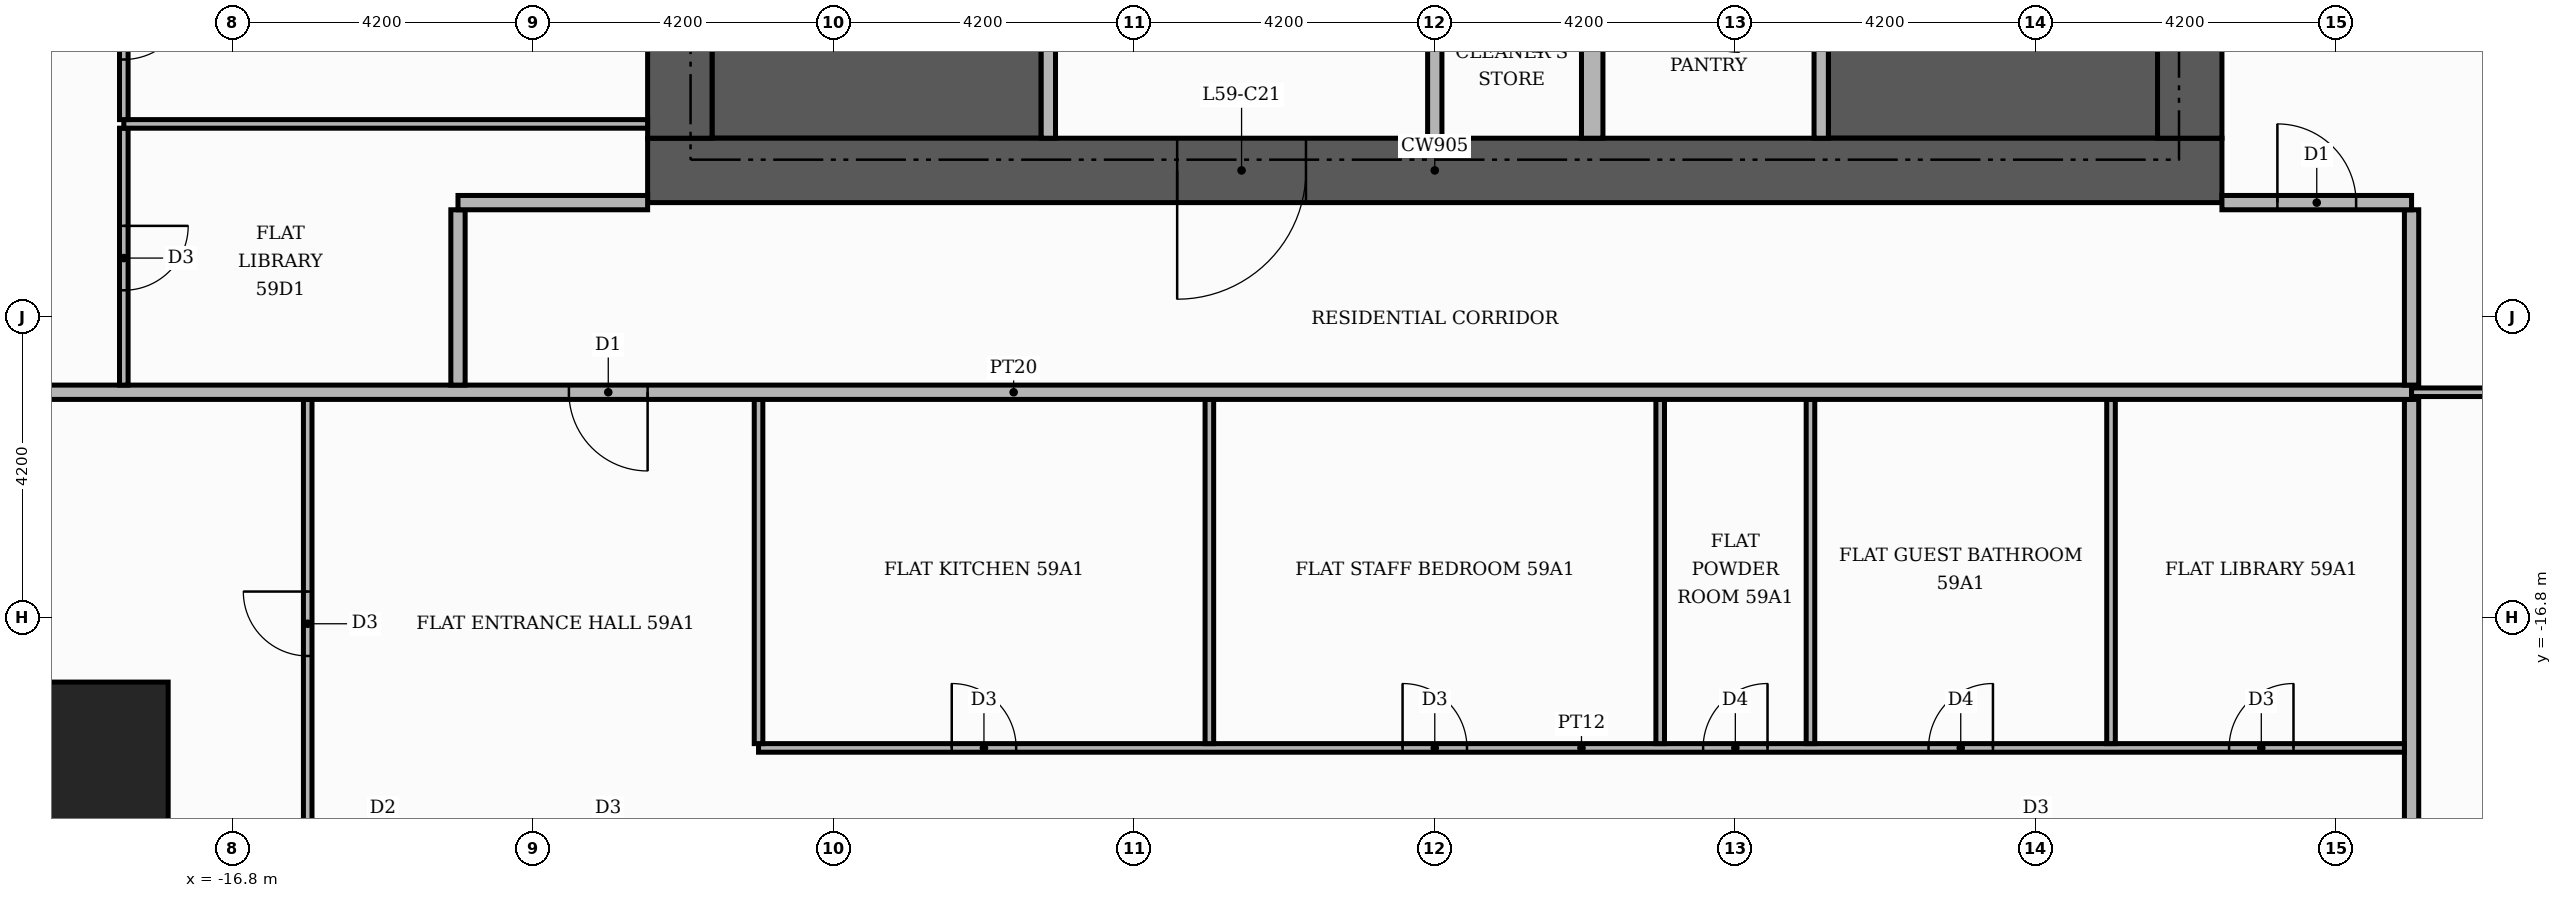
"""IFC4 building model, lengths in metres.
Left out: names, types, materials, properties, quantities, classifications, styles, units other than length and angle.
Written with IfcOpenShell. Run it as: python <this file> out.ifc"""

import sys

from ifc_helpers import new_model, si_unit, direction, frame, frame_2d, origin, origin_2d, place, context, subcontext, project, spatial, rectangle, extrude, element, fill, save


model = new_model("IFC4")
c1 = context("Model", 3, precision=1e-05, world=origin(), true_north=direction((0.0, 1.0)))
c2 = subcontext(c1, "Body", "Model", "MODEL_VIEW")
j1 = project(units=[si_unit("LENGTHUNIT", "METRE"), si_unit("PLANEANGLEUNIT", "RADIAN")], contexts=[c1])
p1 = place(None, origin())
s1 = spatial("IfcSite", under=j1, at=p1, CompositionType="ELEMENT")
p2 = place(p1, origin())
s2 = spatial("IfcBuilding", under=s1, at=p2, CompositionType="ELEMENT")
p3 = place(p2, frame((0.0, 0.0, 248.4)))
s3 = spatial("IfcBuildingStorey", under=s2, at=p3, CompositionType="ELEMENT", Elevation=248.4)
for number, where, z_axis, x_axis in (
    (1, (-10.1, -9.15, 0.0), (0.0, 0.0, 1.0), (1.0, 0.0, 0.0)),
    (2, (5.5, -9.15, 0.0), (0.0, 0.0, 1.0), (1.0, 0.0, 0.0)),
):
    element("IfcWall", number, at=place(p3, frame(where, z_axis=z_axis, x_axis=x_axis)), inside=s3, PredefinedType="SHEAR", context=c2, shape_type="SweptSolid", body=[
        extrude(rectangle(XDim=4.6, YDim=1.9, at=frame_2d((2.3, 0.0))), origin(), (0.0, 0.0, 1.0), 3.48),
    ])
p4 = place(p3, frame((-11.0, -10.55, 0.0), z_axis=(0.0, 0.0, 1.0), x_axis=(1.0, 0.0, 0.0)))
e3 = element("IfcWall", 3, at=p4, inside=s3, PredefinedType="SHEAR", context=c2, shape_type="SweptSolid", body=[
    extrude(rectangle(XDim=22.0, YDim=0.9, at=frame_2d((11.0, 0.0))), origin(), (0.0, 0.0, 1.0), 3.48),
])
p5 = place(p4, frame((7.4, 0.0, 0.0)))
e4 = element("IfcOpeningElement", 4, at=p5, cuts=e3, PredefinedType="OPENING", context=c2, shape_type="SweptSolid", body=[
    extrude(rectangle(XDim=1.8, YDim=2.2, at=frame_2d((0.9, 1.1))), frame((0.0, 0.46, 0.0), z_axis=(0.0, -1.0, 0.0), x_axis=(1.0, 0.0, 0.0)), (0.0, 0.0, 1.0), 0.92),
])
for number, where, z_axis, x_axis in (
    (5, (-10.55, -10.1, 0.0), (0.0, 0.0, 1.0), (0.0, 1.0, 0.0)),
    (6, (10.55, -10.1, 0.0), (0.0, 0.0, 1.0), (0.0, 1.0, 0.0)),
):
    element("IfcWall", number, at=place(p3, frame(where, z_axis=z_axis, x_axis=x_axis)), inside=s3, PredefinedType="SHEAR", context=c2, shape_type="SweptSolid", body=[
        extrude(rectangle(XDim=20.2, YDim=0.9, at=frame_2d((10.1, 0.0))), origin(), (0.0, 0.0, 1.0), 3.48),
    ])
p6 = place(p3, frame((-18.8, -18.8, 0.0), z_axis=(0.0, 0.0, 1.0), x_axis=(1.0, 0.0, 0.0)))
e7 = element("IfcColumn", 7, at=p6, inside=s3, PredefinedType="COLUMN", context=c2, shape_type="SweptSolid", body=[
    extrude(rectangle(XDim=2.2, YDim=2.2, at=origin_2d()), origin(), (0.0, 0.0, 1.0), 3.9),
])
p7 = place(p3, frame((-5.4, -10.1, 0.0), z_axis=(0.0, 0.0, 1.0), x_axis=(0.0, 1.0, 0.0)))
e8 = element("IfcWall", 8, at=p7, inside=s3, PredefinedType="PARTITIONING", context=c2, shape_type="SweptSolid", body=[
    extrude(rectangle(XDim=4.6, YDim=0.2, at=frame_2d((2.3, 0.0))), origin(), (0.0, 0.0, 1.0), 3.48),
])
p8 = place(p7, frame((2.9, 0.0, 0.0)))
e9 = element("IfcOpeningElement", 9, at=p8, cuts=e8, PredefinedType="OPENING", context=c2, shape_type="SweptSolid", body=[
    extrude(rectangle(XDim=1.0, YDim=2.1, at=frame_2d((0.5, 1.05))), frame((0.0, 0.11, 0.0), z_axis=(0.0, -1.0, 0.0), x_axis=(1.0, 0.0, 0.0)), (0.0, 0.0, 1.0), 0.22),
])
p9 = place(p3, frame((0.0, -10.1, 0.0), z_axis=(0.0, 0.0, 1.0), x_axis=(0.0, 1.0, 0.0)))
e10 = element("IfcWall", 10, at=p9, inside=s3, PredefinedType="PARTITIONING", context=c2, shape_type="SweptSolid", body=[
    extrude(rectangle(XDim=2.2, YDim=0.2, at=frame_2d((1.1, 0.0))), origin(), (0.0, 0.0, 1.0), 3.48),
])
p10 = place(p3, frame((2.2, -10.1, 0.0), z_axis=(0.0, 0.0, 1.0), x_axis=(0.0, 1.0, 0.0)))
e11 = element("IfcWall", 11, at=p10, inside=s3, PredefinedType="PARTITIONING", context=c2, shape_type="SweptSolid", body=[
    extrude(rectangle(XDim=2.2, YDim=0.3, at=frame_2d((1.1, 0.0))), origin(), (0.0, 0.0, 1.0), 3.48),
])
p11 = place(p3, frame((5.4, -10.1, 0.0), z_axis=(0.0, 0.0, 1.0), x_axis=(0.0, 1.0, 0.0)))
e12 = element("IfcWall", 12, at=p11, inside=s3, PredefinedType="PARTITIONING", context=c2, shape_type="SweptSolid", body=[
    extrude(rectangle(XDim=4.6, YDim=0.2, at=frame_2d((2.3, 0.0))), origin(), (0.0, 0.0, 1.0), 3.48),
])
p12 = place(p11, frame((2.9, 0.0, 0.0)))
e13 = element("IfcOpeningElement", 13, at=p12, cuts=e12, PredefinedType="OPENING", context=c2, shape_type="SweptSolid", body=[
    extrude(rectangle(XDim=1.0, YDim=2.1, at=frame_2d((0.5, 1.05))), frame((0.0, 0.11, 0.0), z_axis=(0.0, -1.0, 0.0), x_axis=(1.0, 0.0, 0.0)), (0.0, 0.0, 1.0), 0.22),
])
p13 = place(p3, frame((13.65, -25.42, 0.0), z_axis=(0.0, 0.0, 1.0), x_axis=(0.0, 1.0, 0.0)))
e14 = element("IfcWall", 14, at=p13, inside=s3, PredefinedType="PARTITIONING", context=c2, shape_type="SweptSolid", body=[
    extrude(rectangle(XDim=11.67, YDim=0.2, at=frame_2d((5.835, 0.0))), origin(), (0.0, 0.0, 1.0), 3.48),
])
p14 = place(p3, frame((-15.75, -20.06, 0.0), z_axis=(0.0, 0.0, 1.0), x_axis=(0.0, 1.0, 0.0)))
e15 = element("IfcWall", 15, at=p14, inside=s3, PredefinedType="PARTITIONING", context=c2, shape_type="SweptSolid", body=[
    extrude(rectangle(XDim=6.31, YDim=0.12, at=frame_2d((3.155, 0.0))), origin(), (0.0, 0.0, 1.0), 3.48),
])
p15 = place(p14, frame((2.725, 0.0, 0.0)))
e16 = element("IfcOpeningElement", 16, at=p15, cuts=e15, PredefinedType="OPENING", context=c2, shape_type="SweptSolid", body=[
    extrude(rectangle(XDim=0.9, YDim=2.1, at=frame_2d((0.45, 1.05))), frame((0.0, 0.07, 0.0), z_axis=(0.0, -1.0, 0.0), x_axis=(1.0, 0.0, 0.0)), (0.0, 0.0, 1.0), 0.14),
])
p16 = place(p3, frame((-9.45, -18.62, 0.0), z_axis=(0.0, 0.0, 1.0), x_axis=(1.0, 0.0, 0.0)))
e17 = element("IfcWall", 17, at=p16, inside=s3, PredefinedType="PARTITIONING", context=c2, shape_type="SweptSolid", body=[
    extrude(rectangle(XDim=23.0, YDim=0.12, at=frame_2d((11.5, 0.0))), origin(), (0.0, 0.0, 1.0), 3.48),
])
p17 = place(p16, frame((2.7, 0.0, 0.0)))
e18 = element("IfcOpeningElement", 18, at=p17, cuts=e17, PredefinedType="OPENING", context=c2, shape_type="SweptSolid", body=[
    extrude(rectangle(XDim=0.9, YDim=2.1, at=frame_2d((0.45, 1.05))), frame((0.0, 0.07, 0.0), z_axis=(0.0, -1.0, 0.0), x_axis=(1.0, 0.0, 0.0)), (0.0, 0.0, 1.0), 0.14),
])
p18 = place(p16, frame((9.0, 0.0, 0.0)))
e19 = element("IfcOpeningElement", 19, at=p18, cuts=e17, PredefinedType="OPENING", context=c2, shape_type="SweptSolid", body=[
    extrude(rectangle(XDim=0.9, YDim=2.1, at=frame_2d((0.45, 1.05))), frame((0.0, 0.07, 0.0), z_axis=(0.0, -1.0, 0.0), x_axis=(1.0, 0.0, 0.0)), (0.0, 0.0, 1.0), 0.14),
])
p19 = place(p16, frame((13.2, 0.0, 0.0)))
e20 = element("IfcOpeningElement", 20, at=p19, cuts=e17, PredefinedType="OPENING", context=c2, shape_type="SweptSolid", body=[
    extrude(rectangle(XDim=0.9, YDim=2.1, at=frame_2d((0.45, 1.05))), frame((0.0, 0.07, 0.0), z_axis=(0.0, -1.0, 0.0), x_axis=(1.0, 0.0, 0.0)), (0.0, 0.0, 1.0), 0.14),
])
p20 = place(p16, frame((16.35, 0.0, 0.0)))
e21 = element("IfcOpeningElement", 21, at=p20, cuts=e17, PredefinedType="OPENING", context=c2, shape_type="SweptSolid", body=[
    extrude(rectangle(XDim=0.9, YDim=2.1, at=frame_2d((0.45, 1.05))), frame((0.0, 0.07, 0.0), z_axis=(0.0, -1.0, 0.0), x_axis=(1.0, 0.0, 0.0)), (0.0, 0.0, 1.0), 0.14),
])
p21 = place(p16, frame((20.55, 0.0, 0.0)))
e22 = element("IfcOpeningElement", 22, at=p21, cuts=e17, PredefinedType="OPENING", context=c2, shape_type="SweptSolid", body=[
    extrude(rectangle(XDim=0.9, YDim=2.1, at=frame_2d((0.45, 1.05))), frame((0.0, 0.07, 0.0), z_axis=(0.0, -1.0, 0.0), x_axis=(1.0, 0.0, 0.0)), (0.0, 0.0, 1.0), 0.14),
])
for number, where, z_axis, x_axis in (
    (23, (-9.45, -18.56, 0.0), (0.0, 0.0, 1.0), (0.0, 1.0, 0.0)),
    (24, (-3.15, -18.56, 0.0), (0.0, 0.0, 1.0), (0.0, 1.0, 0.0)),
    (25, (3.15, -18.56, 0.0), (0.0, 0.0, 1.0), (0.0, 1.0, 0.0)),
    (26, (5.25, -18.56, 0.0), (0.0, 0.0, 1.0), (0.0, 1.0, 0.0)),
    (27, (9.45, -18.56, 0.0), (0.0, 0.0, 1.0), (0.0, 1.0, 0.0)),
):
    element("IfcWall", number, at=place(p3, frame(where, z_axis=z_axis, x_axis=x_axis)), inside=s3, PredefinedType="PARTITIONING", context=c2, shape_type="SweptSolid", body=[
        extrude(rectangle(XDim=4.81, YDim=0.12, at=frame_2d((2.405, 0.0))), origin(), (0.0, 0.0, 1.0), 3.48),
    ])
p22 = place(p3, frame((-25.42, -13.65, 0.0), z_axis=(0.0, 0.0, 1.0), x_axis=(1.0, 0.0, 0.0)))
e28 = element("IfcWall", 28, at=p22, inside=s3, PredefinedType="PARTITIONING", context=c2, shape_type="SweptSolid", body=[
    extrude(rectangle(XDim=39.07, YDim=0.2, at=frame_2d((19.535, 0.0))), origin(), (0.0, 0.0, 1.0), 3.48),
])
p23 = place(p22, frame((13.32, 0.0, 0.0)))
e29 = element("IfcOpeningElement", 29, at=p23, cuts=e28, PredefinedType="OPENING", context=c2, shape_type="SweptSolid", body=[
    extrude(rectangle(XDim=1.1, YDim=2.4, at=frame_2d((0.55, 1.2))), frame((0.0, 0.11, 0.0), z_axis=(0.0, -1.0, 0.0), x_axis=(1.0, 0.0, 0.0)), (0.0, 0.0, 1.0), 0.22),
])
p24 = place(p3, frame((13.65, -13.65, 0.0), z_axis=(0.0, 0.0, 1.0), x_axis=(1.0, 0.0, 0.0)))
e30 = element("IfcWall", 30, at=p24, inside=s3, PredefinedType="PARTITIONING", context=c2, shape_type="SweptSolid", body=[
    extrude(rectangle(XDim=7.07, YDim=0.12, at=frame_2d((3.535, 0.0))), origin(), (0.0, 0.0, 1.0), 3.48),
])
p25 = place(p24, frame((3.085, 0.0, 0.0)))
e31 = element("IfcOpeningElement", 31, at=p25, cuts=e30, PredefinedType="OPENING", context=c2, shape_type="SweptSolid", body=[
    extrude(rectangle(XDim=0.9, YDim=2.1, at=frame_2d((0.45, 1.05))), frame((0.0, 0.07, 0.0), z_axis=(0.0, -1.0, 0.0), x_axis=(1.0, 0.0, 0.0)), (0.0, 0.0, 1.0), 0.14),
])
p26 = place(p3, frame((-18.32, -13.55, 0.0), z_axis=(0.0, 0.0, 1.0), x_axis=(0.0, 1.0, 0.0)))
e32 = element("IfcWall", 32, at=p26, inside=s3, PredefinedType="PARTITIONING", context=c2, shape_type="SweptSolid", body=[
    extrude(rectangle(XDim=3.59, YDim=0.12, at=frame_2d((1.795, 0.0))), origin(), (0.0, 0.0, 1.0), 3.48),
])
p27 = place(p26, frame((1.325, 0.0, 0.0)))
e33 = element("IfcOpeningElement", 33, at=p27, cuts=e32, PredefinedType="OPENING", context=c2, shape_type="SweptSolid", body=[
    extrude(rectangle(XDim=0.9, YDim=2.1, at=frame_2d((0.45, 1.05))), frame((0.0, 0.07, 0.0), z_axis=(0.0, -1.0, 0.0), x_axis=(1.0, 0.0, 0.0)), (0.0, 0.0, 1.0), 0.14),
])
for number, where, z_axis, x_axis in (
    (34, (-13.65, -13.55, 0.0), (0.0, 0.0, 1.0), (0.0, 1.0, 0.0)),
    (35, (13.65, -13.55, 0.0), (0.0, 0.0, 1.0), (0.0, 1.0, 0.0)),
):
    element("IfcWall", number, at=place(p3, frame(where, z_axis=z_axis, x_axis=x_axis)), inside=s3, PredefinedType="PARTITIONING", context=c2, shape_type="SweptSolid", body=[
        extrude(rectangle(XDim=2.45, YDim=0.2, at=frame_2d((1.225, 0.0))), origin(), (0.0, 0.0, 1.0), 3.48),
    ])
p28 = place(p3, frame((-13.65, -11.0, 0.0), z_axis=(0.0, 0.0, 1.0), x_axis=(1.0, 0.0, 0.0)))
e36 = element("IfcWall", 36, at=p28, inside=s3, PredefinedType="PARTITIONING", context=c2, shape_type="SweptSolid", body=[
    extrude(rectangle(XDim=2.65, YDim=0.2, at=frame_2d((1.325, 0.0))), origin(), (0.0, 0.0, 1.0), 3.48),
])
p29 = place(p3, frame((11.0, -11.0, 0.0), z_axis=(0.0, 0.0, 1.0), x_axis=(1.0, 0.0, 0.0)))
e37 = element("IfcWall", 37, at=p29, inside=s3, PredefinedType="PARTITIONING", context=c2, shape_type="SweptSolid", body=[
    extrude(rectangle(XDim=2.65, YDim=0.2, at=frame_2d((1.325, 0.0))), origin(), (0.0, 0.0, 1.0), 3.48),
])
p30 = place(p29, frame((0.775, 0.0, 0.0)))
e38 = element("IfcOpeningElement", 38, at=p30, cuts=e37, PredefinedType="OPENING", context=c2, shape_type="SweptSolid", body=[
    extrude(rectangle(XDim=1.1, YDim=2.4, at=frame_2d((0.55, 1.2))), frame((0.0, 0.11, 0.0), z_axis=(0.0, -1.0, 0.0), x_axis=(1.0, 0.0, 0.0)), (0.0, 0.0, 1.0), 0.22),
])
p31 = place(p3, frame((-18.32, -9.9, 0.0), z_axis=(0.0, 0.0, 1.0), x_axis=(1.0, 0.0, 0.0)))
e39 = element("IfcWall", 39, at=p31, inside=s3, PredefinedType="PARTITIONING", context=c2, shape_type="SweptSolid", body=[
    extrude(rectangle(XDim=7.32, YDim=0.12, at=frame_2d((3.66, 0.0))), origin(), (0.0, 0.0, 1.0), 3.48),
])
p32 = place(p3, frame((-18.32, -9.84, 0.0), z_axis=(0.0, 0.0, 1.0), x_axis=(0.0, 1.0, 0.0)))
e40 = element("IfcWall", 40, at=p32, inside=s3, PredefinedType="PARTITIONING", context=c2, shape_type="SweptSolid", body=[
    extrude(rectangle(XDim=2.58, YDim=0.12, at=frame_2d((1.29, 0.0))), origin(), (0.0, 0.0, 1.0), 3.48),
])
p33 = place(p32, frame((0.84, 0.0, 0.0)))
e41 = element("IfcOpeningElement", 41, at=p33, cuts=e40, PredefinedType="OPENING", context=c2, shape_type="SweptSolid", body=[
    extrude(rectangle(XDim=0.9, YDim=2.1, at=frame_2d((0.45, 1.05))), frame((0.0, 0.07, 0.0), z_axis=(0.0, -1.0, 0.0), x_axis=(1.0, 0.0, 0.0)), (0.0, 0.0, 1.0), 0.14),
])
p34 = place(p5, frame((1.8, 0.0, 0.0), z_axis=(0.0, 0.0, 1.0), x_axis=(-1.0, 0.0, 0.0)))
e42 = element("IfcDoor", 42, at=p34, inside=s3, OperationType="DOUBLE_DOOR_SINGLE_SWING", PredefinedType="DOOR", context=c2, shape_type="SweptSolid", body=[
    extrude(rectangle(XDim=1.8, YDim=2.2, at=frame_2d((0.9, 1.1))), frame((0.0, 0.025, 0.0), z_axis=(0.0, -1.0, 0.0), x_axis=(1.0, 0.0, 0.0)), (0.0, 0.0, 1.0), 0.05),
])
fill(e4, e42)
p35 = place(p23, frame((1.1, 0.0, 0.0), z_axis=(0.0, 0.0, 1.0), x_axis=(-1.0, 0.0, 0.0)))
e43 = element("IfcDoor", 43, at=p35, inside=s3, OperationType="SINGLE_SWING_RIGHT", PredefinedType="DOOR", context=c2, shape_type="SweptSolid", body=[
    extrude(rectangle(XDim=1.1, YDim=2.4, at=frame_2d((0.55, 1.2))), frame((0.0, 0.025, 0.0), z_axis=(0.0, -1.0, 0.0), x_axis=(1.0, 0.0, 0.0)), (0.0, 0.0, 1.0), 0.05),
])
fill(e29, e43)
p36 = place(p15, origin())
e44 = element("IfcDoor", 44, at=p36, inside=s3, OperationType="SINGLE_SWING_RIGHT", PredefinedType="DOOR", context=c2, shape_type="SweptSolid", body=[
    extrude(rectangle(XDim=0.9, YDim=2.1, at=frame_2d((0.45, 1.05))), frame((0.0, 0.025, 0.0), z_axis=(0.0, -1.0, 0.0), x_axis=(1.0, 0.0, 0.0)), (0.0, 0.0, 1.0), 0.05),
])
fill(e16, e44)
p37 = place(p17, origin())
e45 = element("IfcDoor", 45, at=p37, inside=s3, OperationType="SINGLE_SWING_LEFT", PredefinedType="DOOR", context=c2, shape_type="SweptSolid", body=[
    extrude(rectangle(XDim=0.9, YDim=2.1, at=frame_2d((0.45, 1.05))), frame((0.0, 0.025, 0.0), z_axis=(0.0, -1.0, 0.0), x_axis=(1.0, 0.0, 0.0)), (0.0, 0.0, 1.0), 0.05),
])
fill(e18, e45)
p38 = place(p18, origin())
e46 = element("IfcDoor", 46, at=p38, inside=s3, OperationType="SINGLE_SWING_LEFT", PredefinedType="DOOR", context=c2, shape_type="SweptSolid", body=[
    extrude(rectangle(XDim=0.9, YDim=2.1, at=frame_2d((0.45, 1.05))), frame((0.0, 0.025, 0.0), z_axis=(0.0, -1.0, 0.0), x_axis=(1.0, 0.0, 0.0)), (0.0, 0.0, 1.0), 0.05),
])
fill(e19, e46)
p39 = place(p19, origin())
e47 = element("IfcDoor", 47, at=p39, inside=s3, OperationType="SINGLE_SWING_RIGHT", PredefinedType="DOOR", context=c2, shape_type="SweptSolid", body=[
    extrude(rectangle(XDim=0.9, YDim=2.1, at=frame_2d((0.45, 1.05))), frame((0.0, 0.025, 0.0), z_axis=(0.0, -1.0, 0.0), x_axis=(1.0, 0.0, 0.0)), (0.0, 0.0, 1.0), 0.05),
])
fill(e20, e47)
p40 = place(p20, origin())
e48 = element("IfcDoor", 48, at=p40, inside=s3, OperationType="SINGLE_SWING_RIGHT", PredefinedType="DOOR", context=c2, shape_type="SweptSolid", body=[
    extrude(rectangle(XDim=0.9, YDim=2.1, at=frame_2d((0.45, 1.05))), frame((0.0, 0.025, 0.0), z_axis=(0.0, -1.0, 0.0), x_axis=(1.0, 0.0, 0.0)), (0.0, 0.0, 1.0), 0.05),
])
fill(e21, e48)
p41 = place(p21, origin())
e49 = element("IfcDoor", 49, at=p41, inside=s3, OperationType="SINGLE_SWING_RIGHT", PredefinedType="DOOR", context=c2, shape_type="SweptSolid", body=[
    extrude(rectangle(XDim=0.9, YDim=2.1, at=frame_2d((0.45, 1.05))), frame((0.0, 0.025, 0.0), z_axis=(0.0, -1.0, 0.0), x_axis=(1.0, 0.0, 0.0)), (0.0, 0.0, 1.0), 0.05),
])
fill(e22, e49)
p42 = place(p30, origin())
e50 = element("IfcDoor", 50, at=p42, inside=s3, OperationType="SINGLE_SWING_LEFT", PredefinedType="DOOR", context=c2, shape_type="SweptSolid", body=[
    extrude(rectangle(XDim=1.1, YDim=2.4, at=frame_2d((0.55, 1.2))), frame((0.0, 0.025, 0.0), z_axis=(0.0, -1.0, 0.0), x_axis=(1.0, 0.0, 0.0)), (0.0, 0.0, 1.0), 0.05),
])
fill(e38, e50)
p43 = place(p33, frame((0.9, 0.0, 0.0), z_axis=(0.0, 0.0, 1.0), x_axis=(-1.0, 0.0, 0.0)))
e51 = element("IfcDoor", 51, at=p43, inside=s3, OperationType="SINGLE_SWING_RIGHT", PredefinedType="DOOR", context=c2, shape_type="SweptSolid", body=[
    extrude(rectangle(XDim=0.9, YDim=2.1, at=frame_2d((0.45, 1.05))), frame((0.0, 0.025, 0.0), z_axis=(0.0, -1.0, 0.0), x_axis=(1.0, 0.0, 0.0)), (0.0, 0.0, 1.0), 0.05),
])
fill(e41, e51)
p44 = place(p27, frame((0.9, 0.0, 0.0), z_axis=(0.0, 0.0, 1.0), x_axis=(-1.0, 0.0, 0.0)))
e52 = element("IfcDoor", 52, at=p44, inside=s3, OperationType="SINGLE_SWING_RIGHT", PredefinedType="DOOR", context=c2, shape_type="SweptSolid", body=[
    extrude(rectangle(XDim=0.9, YDim=2.1, at=frame_2d((0.45, 1.05))), frame((0.0, 0.025, 0.0), z_axis=(0.0, -1.0, 0.0), x_axis=(1.0, 0.0, 0.0)), (0.0, 0.0, 1.0), 0.05),
])
fill(e33, e52)
save(model, sys.argv[1])
